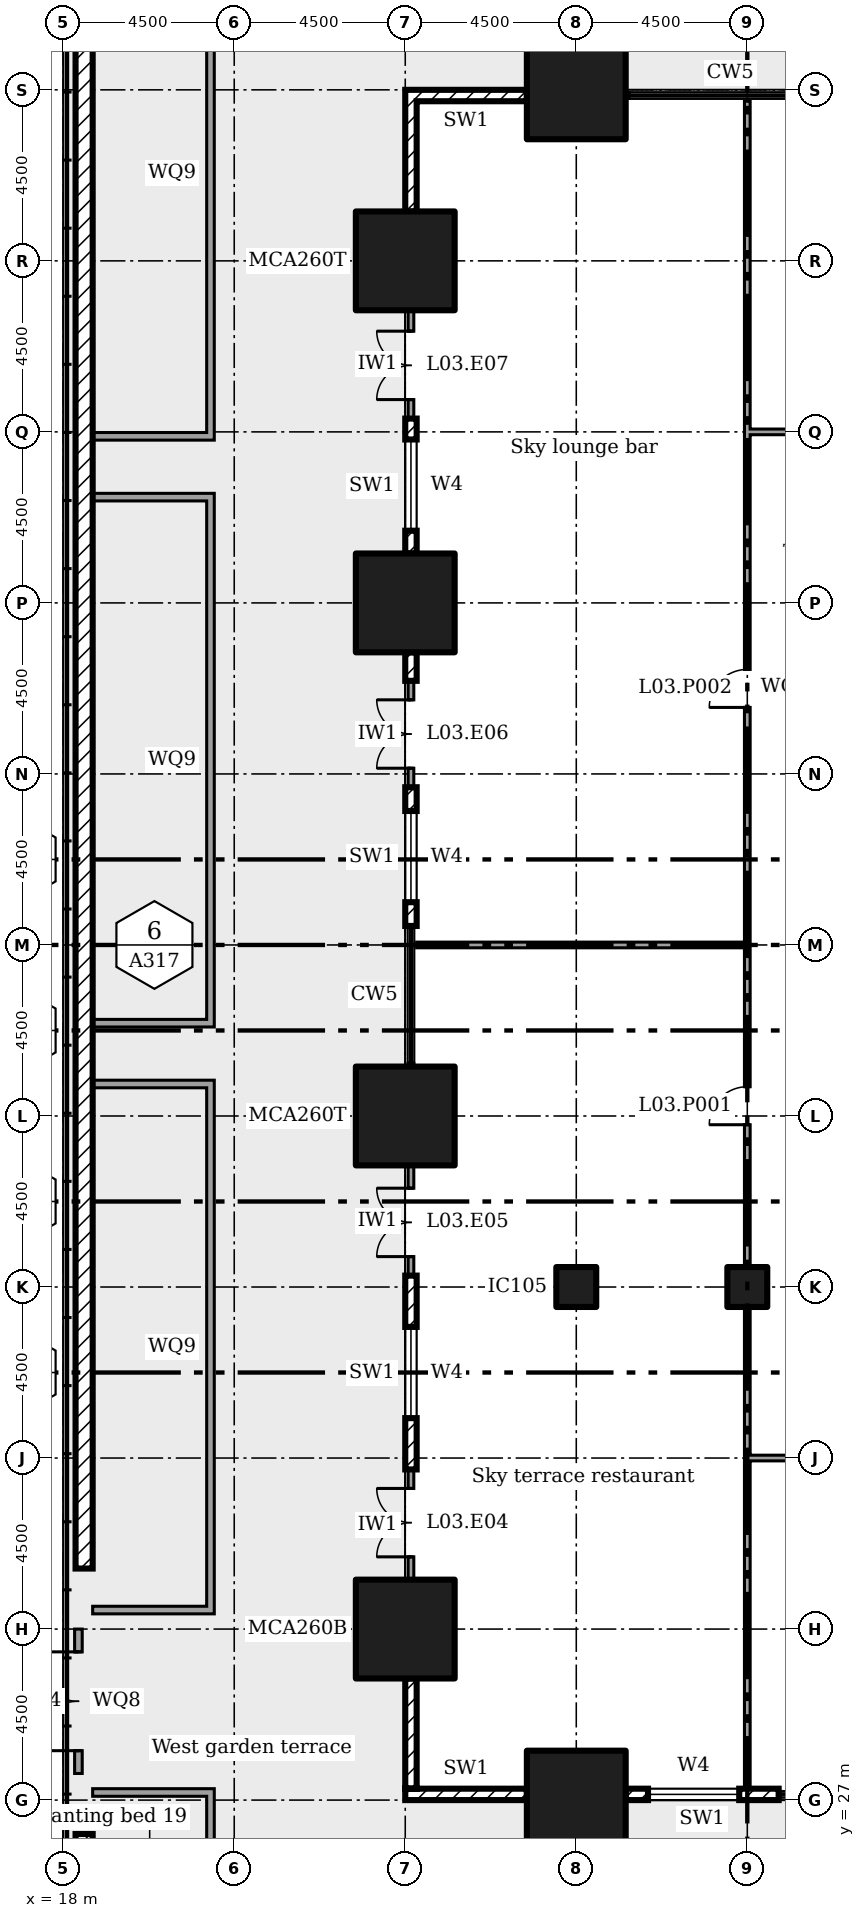
"""IFC4 building model, lengths in metres.
Left out: names, types, materials, properties, quantities, classifications, styles, units other than length and angle.
Written with IfcOpenShell. Run it as: python <this file> out.ifc"""

import sys

from ifc_helpers import new_model, si_unit, direction, frame, frame_2d, origin, origin_2d, place, context, subcontext, project, spatial, rectangle, extrude, element, fill, save


model = new_model("IFC4")
c1 = context("Model", 3, precision=1e-05, world=origin(), true_north=direction((0.0, 1.0)))
c2 = subcontext(c1, "Body", "Model", "MODEL_VIEW")
j1 = project(units=[si_unit("LENGTHUNIT", "METRE"), si_unit("PLANEANGLEUNIT", "RADIAN")], contexts=[c1])
p1 = place(None, origin())
s1 = spatial("IfcSite", under=j1, at=p1, CompositionType="ELEMENT")
p2 = place(p1, origin())
s2 = spatial("IfcBuilding", under=s1, at=p2, CompositionType="ELEMENT")
p3 = place(p2, frame((0.0, 0.0, 16.5)))
s3 = spatial("IfcBuildingStorey", under=s2, at=p3, CompositionType="ELEMENT", Elevation=16.5)
for number, where in (
    (1, (27.0, 31.5, 0.0)),
    (2, (27.0, 45.0, 0.0)),
    (3, (27.0, 58.5, 0.0)),
    (4, (27.0, 67.5, 0.0)),
    (5, (31.5, 27.0, 0.0)),
    (6, (31.5, 72.0, 0.0)),
):
    element("IfcColumn", number, at=place(p3, frame(where)), inside=s3, PredefinedType="COLUMN", context=c2, shape_type="SweptSolid", body=[
        extrude(rectangle(XDim=2.6, YDim=2.6, at=origin_2d()), origin(), (0.0, 0.0, 1.0), 4.5),
    ])
for number, where in (
    (7, (31.5, 40.5, 0.0)),
    (8, (36.0, 40.5, 0.0)),
):
    element("IfcColumn", number, at=place(p3, frame(where)), inside=s3, PredefinedType="COLUMN", context=c2, shape_type="SweptSolid", body=[
        extrude(rectangle(XDim=1.05, YDim=1.05, at=origin_2d()), origin(), (0.0, 0.0, 1.0), 4.5),
    ])
p4 = place(p3, frame((27.0, 27.15, 0.0)))
e9 = element("IfcWall", 9, at=p4, inside=s3, PredefinedType="ELEMENTEDWALL", context=c2, shape_type="SweptSolid", body=[
    extrude(rectangle(XDim=3.2, YDim=0.3, at=frame_2d((1.6, 0.0))), origin(), (0.0, 0.0, 1.0), 4.05),
])
p5 = place(p3, frame((32.8, 27.15, 0.0)))
e10 = element("IfcWall", 10, at=p5, inside=s3, PredefinedType="ELEMENTEDWALL", context=c2, shape_type="SweptSolid", body=[
    extrude(rectangle(XDim=4.025, YDim=0.3, at=frame_2d((2.012, 0.0))), origin(), (0.0, 0.0, 1.0), 2.25),
])
p6 = place(p5, frame((0.587, 0.0, 0.45)))
e11 = element("IfcOpeningElement", 11, at=p6, cuts=e10, PredefinedType="OPENING", context=c2, shape_type="SweptSolid", body=[
    extrude(rectangle(XDim=2.4, YDim=1.7, at=frame_2d((1.2, 0.85))), frame((0.0, 0.16, 0.0), z_axis=(0.0, -1.0, 0.0), x_axis=(1.0, 0.0, 0.0)), (0.0, 0.0, 1.0), 0.32),
])
p7 = place(p3, frame((30.2, 71.85, 0.0), z_axis=(0.0, 0.0, 1.0), x_axis=(-1.0, 0.0, 0.0)))
e12 = element("IfcWall", 12, at=p7, inside=s3, PredefinedType="ELEMENTEDWALL", context=c2, shape_type="SweptSolid", body=[
    extrude(rectangle(XDim=3.2, YDim=0.3, at=frame_2d((1.6, 0.0))), origin(), (0.0, 0.0, 1.0), 4.05),
])
p8 = place(p3, frame((27.15, 71.7, 0.0), z_axis=(0.0, 0.0, 1.0), x_axis=(0.0, -1.0, 0.0)))
e13 = element("IfcWall", 13, at=p8, inside=s3, PredefinedType="ELEMENTEDWALL", context=c2, shape_type="SweptSolid", body=[
    extrude(rectangle(XDim=2.9, YDim=0.3, at=frame_2d((1.45, 0.0))), origin(), (0.0, 0.0, 1.0), 4.05),
])
p9 = place(p3, frame((27.15, 66.2, 0.0), z_axis=(0.0, 0.0, 1.0), x_axis=(0.0, -1.0, 0.0)))
e14 = element("IfcWall", 14, at=p9, inside=s3, PredefinedType="SOLIDWALL", context=c2, shape_type="SweptSolid", body=[
    extrude(rectangle(XDim=2.85, YDim=0.15, at=frame_2d((1.425, 0.0))), origin(), (0.0, 0.0, 1.0), 2.25),
])
p10 = place(p9, frame((0.55, 0.0, 0.0)))
e15 = element("IfcOpeningElement", 15, at=p10, cuts=e14, PredefinedType="OPENING", context=c2, shape_type="SweptSolid", body=[
    extrude(rectangle(XDim=1.8, YDim=2.1, at=frame_2d((0.9, 1.05))), frame((0.0, 0.085, 0.0), z_axis=(0.0, -1.0, 0.0), x_axis=(1.0, 0.0, 0.0)), (0.0, 0.0, 1.0), 0.17),
])
p11 = place(p3, frame((27.15, 63.35, 0.0), z_axis=(0.0, 0.0, 1.0), x_axis=(0.0, -1.0, 0.0)))
e16 = element("IfcWall", 16, at=p11, inside=s3, PredefinedType="ELEMENTEDWALL", context=c2, shape_type="SweptSolid", body=[
    extrude(rectangle(XDim=3.55, YDim=0.3, at=frame_2d((1.775, 0.0))), origin(), (0.0, 0.0, 1.0), 2.25),
])
p12 = place(p11, frame((0.55, 0.0, 0.45)))
e17 = element("IfcOpeningElement", 17, at=p12, cuts=e16, PredefinedType="OPENING", context=c2, shape_type="SweptSolid", body=[
    extrude(rectangle(XDim=2.4, YDim=1.7, at=frame_2d((1.2, 0.85))), frame((0.0, 0.16, 0.0), z_axis=(0.0, -1.0, 0.0), x_axis=(1.0, 0.0, 0.0)), (0.0, 0.0, 1.0), 0.32),
])
p13 = place(p3, frame((27.15, 57.2, 0.0), z_axis=(0.0, 0.0, 1.0), x_axis=(0.0, -1.0, 0.0)))
e18 = element("IfcWall", 18, at=p13, inside=s3, PredefinedType="ELEMENTEDWALL", context=c2, shape_type="SweptSolid", body=[
    extrude(rectangle(XDim=0.75, YDim=0.3, at=frame_2d((0.375, 0.0))), origin(), (0.0, 0.0, 1.0), 2.25),
])
p14 = place(p3, frame((27.15, 56.45, 0.0), z_axis=(0.0, 0.0, 1.0), x_axis=(0.0, -1.0, 0.0)))
e19 = element("IfcWall", 19, at=p14, inside=s3, PredefinedType="SOLIDWALL", context=c2, shape_type="SweptSolid", body=[
    extrude(rectangle(XDim=2.8, YDim=0.15, at=frame_2d((1.4, 0.0))), origin(), (0.0, 0.0, 1.0), 2.25),
])
p15 = place(p14, frame((0.5, 0.0, 0.0)))
e20 = element("IfcOpeningElement", 20, at=p15, cuts=e19, PredefinedType="OPENING", context=c2, shape_type="SweptSolid", body=[
    extrude(rectangle(XDim=1.8, YDim=2.1, at=frame_2d((0.9, 1.05))), frame((0.0, 0.085, 0.0), z_axis=(0.0, -1.0, 0.0), x_axis=(1.0, 0.0, 0.0)), (0.0, 0.0, 1.0), 0.17),
])
p16 = place(p3, frame((27.15, 53.65, 0.0), z_axis=(0.0, 0.0, 1.0), x_axis=(0.0, -1.0, 0.0)))
e21 = element("IfcWall", 21, at=p16, inside=s3, PredefinedType="ELEMENTEDWALL", context=c2, shape_type="SweptSolid", body=[
    extrude(rectangle(XDim=3.65, YDim=0.3, at=frame_2d((1.825, 0.0))), origin(), (0.0, 0.0, 1.0), 2.25),
])
p17 = place(p16, frame((0.625, 0.0, 0.45)))
e22 = element("IfcOpeningElement", 22, at=p17, cuts=e21, PredefinedType="OPENING", context=c2, shape_type="SweptSolid", body=[
    extrude(rectangle(XDim=2.4, YDim=1.7, at=frame_2d((1.2, 0.85))), frame((0.0, 0.16, 0.0), z_axis=(0.0, -1.0, 0.0), x_axis=(1.0, 0.0, 0.0)), (0.0, 0.0, 1.0), 0.32),
])
p18 = place(p3, frame((27.15, 43.7, 0.0), z_axis=(0.0, 0.0, 1.0), x_axis=(0.0, -1.0, 0.0)))
e23 = element("IfcWall", 23, at=p18, inside=s3, PredefinedType="SOLIDWALL", context=c2, shape_type="SweptSolid", body=[
    extrude(rectangle(XDim=2.9, YDim=0.15, at=frame_2d((1.45, 0.0))), origin(), (0.0, 0.0, 1.0), 2.25),
])
p19 = place(p18, frame((0.6, 0.0, 0.0)))
e24 = element("IfcOpeningElement", 24, at=p19, cuts=e23, PredefinedType="OPENING", context=c2, shape_type="SweptSolid", body=[
    extrude(rectangle(XDim=1.8, YDim=2.1, at=frame_2d((0.9, 1.05))), frame((0.0, 0.085, 0.0), z_axis=(0.0, -1.0, 0.0), x_axis=(1.0, 0.0, 0.0)), (0.0, 0.0, 1.0), 0.17),
])
p20 = place(p3, frame((27.15, 40.8, 0.0), z_axis=(0.0, 0.0, 1.0), x_axis=(0.0, -1.0, 0.0)))
e25 = element("IfcWall", 25, at=p20, inside=s3, PredefinedType="ELEMENTEDWALL", context=c2, shape_type="SweptSolid", body=[
    extrude(rectangle(XDim=5.1, YDim=0.3, at=frame_2d((2.55, 0.0))), origin(), (0.0, 0.0, 1.0), 2.25),
])
p21 = place(p20, frame((1.35, 0.0, 0.45)))
e26 = element("IfcOpeningElement", 26, at=p21, cuts=e25, PredefinedType="OPENING", context=c2, shape_type="SweptSolid", body=[
    extrude(rectangle(XDim=2.4, YDim=1.7, at=frame_2d((1.2, 0.85))), frame((0.0, 0.16, 0.0), z_axis=(0.0, -1.0, 0.0), x_axis=(1.0, 0.0, 0.0)), (0.0, 0.0, 1.0), 0.32),
])
p22 = place(p3, frame((27.15, 35.7, 0.0), z_axis=(0.0, 0.0, 1.0), x_axis=(0.0, -1.0, 0.0)))
e27 = element("IfcWall", 27, at=p22, inside=s3, PredefinedType="SOLIDWALL", context=c2, shape_type="SweptSolid", body=[
    extrude(rectangle(XDim=2.9, YDim=0.15, at=frame_2d((1.45, 0.0))), origin(), (0.0, 0.0, 1.0), 2.25),
])
p23 = place(p22, frame((0.5, 0.0, 0.0)))
e28 = element("IfcOpeningElement", 28, at=p23, cuts=e27, PredefinedType="OPENING", context=c2, shape_type="SweptSolid", body=[
    extrude(rectangle(XDim=1.8, YDim=2.1, at=frame_2d((0.9, 1.05))), frame((0.0, 0.085, 0.0), z_axis=(0.0, -1.0, 0.0), x_axis=(1.0, 0.0, 0.0)), (0.0, 0.0, 1.0), 0.17),
])
p24 = place(p3, frame((27.15, 30.2, 0.0), z_axis=(0.0, 0.0, 1.0), x_axis=(0.0, -1.0, 0.0)))
e29 = element("IfcWall", 29, at=p24, inside=s3, PredefinedType="ELEMENTEDWALL", context=c2, shape_type="SweptSolid", body=[
    extrude(rectangle(XDim=2.9, YDim=0.3, at=frame_2d((1.45, 0.0))), origin(), (0.0, 0.0, 1.0), 4.05),
])
p25 = place(p3, frame((18.55, 80.225, 0.0), z_axis=(0.0, 0.0, 1.0), x_axis=(0.0, -1.0, 0.0)))
e30 = element("IfcWall", 30, at=p25, inside=s3, PredefinedType="SOLIDWALL", context=c2, shape_type="SweptSolid", body=[
    extrude(rectangle(XDim=47.133, YDim=0.45, at=frame_2d((23.566, 0.0))), origin(), (0.0, 0.0, 1.0), 0.6),
])
p26 = place(p3, frame((18.55, 26.107, 0.0), z_axis=(0.0, 0.0, 1.0), x_axis=(0.0, -1.0, 0.0)))
e31 = element("IfcWall", 31, at=p26, inside=s3, PredefinedType="SOLIDWALL", context=c2, shape_type="SweptSolid", body=[
    extrude(rectangle(XDim=7.333, YDim=0.45, at=frame_2d((3.666, 0.0))), origin(), (0.0, 0.0, 1.0), 0.6),
])
p27 = place(p3, frame((21.875, 22.175, 0.0), z_axis=(0.0, 0.0, 1.0), x_axis=(0.0, 1.0, 0.0)))
e32 = element("IfcWall", 32, at=p27, inside=s3, PredefinedType="SOLIDWALL", context=c2, shape_type="SweptSolid", body=[
    extrude(rectangle(XDim=5.125, YDim=0.2, at=frame_2d((2.562, 0.0))), origin(), (0.0, 0.0, 1.0), 0.45),
])
p28 = place(p3, frame((18.775, 27.2, 0.0)))
e33 = element("IfcWall", 33, at=p28, inside=s3, PredefinedType="SOLIDWALL", context=c2, shape_type="SweptSolid", body=[
    extrude(rectangle(XDim=3.0, YDim=0.2, at=frame_2d((1.5, 0.0))), origin(), (0.0, 0.0, 1.0), 0.45),
])
p29 = place(p3, frame((21.875, 31.9, 0.0), z_axis=(0.0, 0.0, 1.0), x_axis=(0.0, 1.0, 0.0)))
e34 = element("IfcWall", 34, at=p29, inside=s3, PredefinedType="SOLIDWALL", context=c2, shape_type="SweptSolid", body=[
    extrude(rectangle(XDim=14.042, YDim=0.2, at=frame_2d((7.021, 0.0))), origin(), (0.0, 0.0, 1.0), 0.45),
])
for number, where in (
    (35, (18.775, 45.842, 0.0)),
    (36, (18.775, 32.0, 0.0)),
):
    element("IfcWall", number, at=place(p3, frame(where)), inside=s3, PredefinedType="SOLIDWALL", context=c2, shape_type="SweptSolid", body=[
        extrude(rectangle(XDim=3.0, YDim=0.2, at=frame_2d((1.5, 0.0))), origin(), (0.0, 0.0, 1.0), 0.45),
    ])
p30 = place(p3, frame((21.875, 47.342, 0.0), z_axis=(0.0, 0.0, 1.0), x_axis=(0.0, 1.0, 0.0)))
e37 = element("IfcWall", 37, at=p30, inside=s3, PredefinedType="SOLIDWALL", context=c2, shape_type="SweptSolid", body=[
    extrude(rectangle(XDim=14.042, YDim=0.2, at=frame_2d((7.021, 0.0))), origin(), (0.0, 0.0, 1.0), 0.45),
])
for number, where in (
    (38, (18.775, 61.283, 0.0)),
    (39, (18.775, 47.442, 0.0)),
):
    element("IfcWall", number, at=place(p3, frame(where)), inside=s3, PredefinedType="SOLIDWALL", context=c2, shape_type="SweptSolid", body=[
        extrude(rectangle(XDim=3.0, YDim=0.2, at=frame_2d((1.5, 0.0))), origin(), (0.0, 0.0, 1.0), 0.45),
    ])
p31 = place(p3, frame((21.875, 62.783, 0.0), z_axis=(0.0, 0.0, 1.0), x_axis=(0.0, 1.0, 0.0)))
e40 = element("IfcWall", 40, at=p31, inside=s3, PredefinedType="SOLIDWALL", context=c2, shape_type="SweptSolid", body=[
    extrude(rectangle(XDim=14.042, YDim=0.2, at=frame_2d((7.021, 0.0))), origin(), (0.0, 0.0, 1.0), 0.45),
])
p32 = place(p3, frame((18.775, 62.883, 0.0)))
e41 = element("IfcWall", 41, at=p32, inside=s3, PredefinedType="SOLIDWALL", context=c2, shape_type="SweptSolid", body=[
    extrude(rectangle(XDim=3.0, YDim=0.2, at=frame_2d((1.5, 0.0))), origin(), (0.0, 0.0, 1.0), 0.45),
])
p33 = place(p3, frame((36.0, 35.925, 0.0), z_axis=(0.0, 0.0, 1.0), x_axis=(0.0, 1.0, 0.0)))
e42 = element("IfcWall", 42, at=p33, inside=s3, PredefinedType="PARTITIONING", context=c2, shape_type="SweptSolid", body=[
    extrude(rectangle(XDim=4.055, YDim=0.15, at=frame_2d((2.027, 0.0))), origin(), (0.0, 0.0, 1.0), 4.05),
])
p34 = place(p3, frame((36.0, 41.02, 0.0), z_axis=(0.0, 0.0, 1.0), x_axis=(0.0, 1.0, 0.0)))
e43 = element("IfcWall", 43, at=p34, inside=s3, PredefinedType="PARTITIONING", context=c2, shape_type="SweptSolid", body=[
    extrude(rectangle(XDim=8.555, YDim=0.15, at=frame_2d((4.277, 0.0))), origin(), (0.0, 0.0, 1.0), 4.05),
])
p35 = place(p34, frame((3.75, 0.0, 0.0)))
e44 = element("IfcOpeningElement", 44, at=p35, cuts=e43, PredefinedType="OPENING", context=c2, shape_type="SweptSolid", body=[
    extrude(rectangle(XDim=1.0, YDim=2.1, at=frame_2d((0.5, 1.05))), frame((0.0, 0.085, 0.0), z_axis=(0.0, -1.0, 0.0), x_axis=(1.0, 0.0, 0.0)), (0.0, 0.0, 1.0), 0.17),
])
p36 = place(p3, frame((36.0, 49.5, 0.0), z_axis=(0.0, 0.0, 1.0), x_axis=(0.0, 1.0, 0.0)))
e45 = element("IfcWall", 45, at=p36, inside=s3, PredefinedType="PARTITIONING", context=c2, shape_type="SweptSolid", body=[
    extrude(rectangle(XDim=13.575, YDim=0.15, at=frame_2d((6.788, 0.0))), origin(), (0.0, 0.0, 1.0), 4.05),
])
p37 = place(p36, frame((6.25, 0.0, 0.0)))
e46 = element("IfcOpeningElement", 46, at=p37, cuts=e45, PredefinedType="OPENING", context=c2, shape_type="SweptSolid", body=[
    extrude(rectangle(XDim=1.0, YDim=2.1, at=frame_2d((0.5, 1.05))), frame((0.0, 0.085, 0.0), z_axis=(0.0, -1.0, 0.0), x_axis=(1.0, 0.0, 0.0)), (0.0, 0.0, 1.0), 0.17),
])
p38 = place(p3, frame((36.075, 36.0, 0.0)))
e47 = element("IfcWall", 47, at=p38, inside=s3, PredefinedType="PARTITIONING", context=c2, shape_type="SweptSolid", body=[
    extrude(rectangle(XDim=21.905, YDim=0.15, at=frame_2d((10.953, 0.0))), origin(), (0.0, 0.0, 1.0), 4.05),
])
p39 = place(p38, frame((10.425, 0.0, 0.0)))
e48 = element("IfcOpeningElement", 48, at=p39, cuts=e47, PredefinedType="OPENING", context=c2, shape_type="SweptSolid", body=[
    extrude(rectangle(XDim=1.0, YDim=2.1, at=frame_2d((0.5, 1.05))), frame((0.0, 0.085, 0.0), z_axis=(0.0, -1.0, 0.0), x_axis=(1.0, 0.0, 0.0)), (0.0, 0.0, 1.0), 0.17),
])
p40 = place(p3, frame((36.075, 63.0, 0.0)))
e49 = element("IfcWall", 49, at=p40, inside=s3, PredefinedType="PARTITIONING", context=c2, shape_type="SweptSolid", body=[
    extrude(rectangle(XDim=3.75, YDim=0.15, at=frame_2d((1.875, 0.0))), origin(), (0.0, 0.0, 1.0), 4.05),
])
p41 = place(p3, frame((27.3, 49.5, 0.0)))
e50 = element("IfcWall", 50, at=p41, inside=s3, PredefinedType="PARTITIONING", context=c2, shape_type="SweptSolid", body=[
    extrude(rectangle(XDim=8.625, YDim=0.15, at=frame_2d((4.312, 0.0))), origin(), (0.0, 0.0, 1.0), 4.05),
])
for number, where, z_axis, x_axis in (
    (51, (36.0, 27.3, 0.0), (0.0, 0.0, 1.0), (0.0, 1.0, 0.0)),
    (52, (36.0, 63.0, 0.0), (0.0, 0.0, 1.0), (0.0, 1.0, 0.0)),
):
    element("IfcWall", number, at=place(p3, frame(where, z_axis=z_axis, x_axis=x_axis)), inside=s3, PredefinedType="PARTITIONING", context=c2, shape_type="SweptSolid", body=[
        extrude(rectangle(XDim=8.7, YDim=0.15, at=frame_2d((4.35, 0.0))), origin(), (0.0, 0.0, 1.0), 4.05),
    ])
p42 = place(p3, frame((18.4, 27.7, 0.0), z_axis=(0.0, 0.0, 1.0), x_axis=(0.0, 1.0, 0.0)))
e53 = element("IfcWall", 53, at=p42, inside=s3, PredefinedType="SOLIDWALL", context=c2, shape_type="SweptSolid", body=[
    extrude(rectangle(XDim=3.8, YDim=0.2, at=frame_2d((1.9, 0.0))), origin(), (0.0, 0.0, 1.0), 2.3),
])
p43 = place(p42, frame((0.6, 0.0, 0.0)))
e54 = element("IfcOpeningElement", 54, at=p43, cuts=e53, PredefinedType="OPENING", context=c2, shape_type="SweptSolid", body=[
    extrude(rectangle(XDim=2.6, YDim=2.1, at=frame_2d((1.3, 1.05))), frame((0.0, 0.11, 0.0), z_axis=(0.0, -1.0, 0.0), x_axis=(1.0, 0.0, 0.0)), (0.0, 0.0, 1.0), 0.22),
])
p44 = place(p6, origin())
e55 = element("IfcWindow", 55, at=p44, inside=s3, PartitioningType="SINGLE_PANEL", PredefinedType="WINDOW", context=c2, shape_type="SweptSolid", body=[
    extrude(rectangle(XDim=2.4, YDim=1.7, at=frame_2d((1.2, 0.85))), frame((0.0, 0.03, 0.0), z_axis=(0.0, -1.0, 0.0), x_axis=(1.0, 0.0, 0.0)), (0.0, 0.0, 1.0), 0.06),
])
fill(e11, e55)
p45 = place(p10, frame((1.8, 0.0, 0.0), x_axis=(-1.0, 0.0, 0.0)))
e56 = element("IfcDoor", 56, at=p45, inside=s3, OperationType="DOUBLE_DOOR_DOUBLE_SWING", PredefinedType="NOTDEFINED", context=c2, shape_type="SweptSolid", body=[
    extrude(rectangle(XDim=1.8, YDim=2.1, at=frame_2d((0.9, 1.05))), frame((0.0, 0.025, 0.0), z_axis=(0.0, -1.0, 0.0), x_axis=(1.0, 0.0, 0.0)), (0.0, 0.0, 1.0), 0.05),
])
fill(e15, e56)
p46 = place(p12, origin())
e57 = element("IfcWindow", 57, at=p46, inside=s3, PartitioningType="SINGLE_PANEL", PredefinedType="WINDOW", context=c2, shape_type="SweptSolid", body=[
    extrude(rectangle(XDim=2.4, YDim=1.7, at=frame_2d((1.2, 0.85))), frame((0.0, 0.03, 0.0), z_axis=(0.0, -1.0, 0.0), x_axis=(1.0, 0.0, 0.0)), (0.0, 0.0, 1.0), 0.06),
])
fill(e17, e57)
p47 = place(p15, frame((1.8, 0.0, 0.0), x_axis=(-1.0, 0.0, 0.0)))
e58 = element("IfcDoor", 58, at=p47, inside=s3, OperationType="DOUBLE_DOOR_DOUBLE_SWING", PredefinedType="NOTDEFINED", context=c2, shape_type="SweptSolid", body=[
    extrude(rectangle(XDim=1.8, YDim=2.1, at=frame_2d((0.9, 1.05))), frame((0.0, 0.025, 0.0), z_axis=(0.0, -1.0, 0.0), x_axis=(1.0, 0.0, 0.0)), (0.0, 0.0, 1.0), 0.05),
])
fill(e20, e58)
p48 = place(p17, origin())
e59 = element("IfcWindow", 59, at=p48, inside=s3, PartitioningType="SINGLE_PANEL", PredefinedType="WINDOW", context=c2, shape_type="SweptSolid", body=[
    extrude(rectangle(XDim=2.4, YDim=1.7, at=frame_2d((1.2, 0.85))), frame((0.0, 0.03, 0.0), z_axis=(0.0, -1.0, 0.0), x_axis=(1.0, 0.0, 0.0)), (0.0, 0.0, 1.0), 0.06),
])
fill(e22, e59)
p49 = place(p19, frame((1.8, 0.0, 0.0), x_axis=(-1.0, 0.0, 0.0)))
e60 = element("IfcDoor", 60, at=p49, inside=s3, OperationType="DOUBLE_DOOR_DOUBLE_SWING", PredefinedType="NOTDEFINED", context=c2, shape_type="SweptSolid", body=[
    extrude(rectangle(XDim=1.8, YDim=2.1, at=frame_2d((0.9, 1.05))), frame((0.0, 0.025, 0.0), z_axis=(0.0, -1.0, 0.0), x_axis=(1.0, 0.0, 0.0)), (0.0, 0.0, 1.0), 0.05),
])
fill(e24, e60)
p50 = place(p21, origin())
e61 = element("IfcWindow", 61, at=p50, inside=s3, PartitioningType="SINGLE_PANEL", PredefinedType="WINDOW", context=c2, shape_type="SweptSolid", body=[
    extrude(rectangle(XDim=2.4, YDim=1.7, at=frame_2d((1.2, 0.85))), frame((0.0, 0.03, 0.0), z_axis=(0.0, -1.0, 0.0), x_axis=(1.0, 0.0, 0.0)), (0.0, 0.0, 1.0), 0.06),
])
fill(e26, e61)
p51 = place(p23, frame((1.8, 0.0, 0.0), x_axis=(-1.0, 0.0, 0.0)))
e62 = element("IfcDoor", 62, at=p51, inside=s3, OperationType="DOUBLE_DOOR_DOUBLE_SWING", PredefinedType="NOTDEFINED", context=c2, shape_type="SweptSolid", body=[
    extrude(rectangle(XDim=1.8, YDim=2.1, at=frame_2d((0.9, 1.05))), frame((0.0, 0.025, 0.0), z_axis=(0.0, -1.0, 0.0), x_axis=(1.0, 0.0, 0.0)), (0.0, 0.0, 1.0), 0.05),
])
fill(e28, e62)
p52 = place(p35, origin())
e63 = element("IfcDoor", 63, at=p52, inside=s3, OperationType="SINGLE_SWING_RIGHT", PredefinedType="DOOR", context=c2, shape_type="SweptSolid", body=[
    extrude(rectangle(XDim=1.0, YDim=2.1, at=frame_2d((0.5, 1.05))), frame((0.0, 0.025, 0.0), z_axis=(0.0, -1.0, 0.0), x_axis=(1.0, 0.0, 0.0)), (0.0, 0.0, 1.0), 0.05),
])
fill(e44, e63)
p53 = place(p37, origin())
e64 = element("IfcDoor", 64, at=p53, inside=s3, OperationType="SINGLE_SWING_RIGHT", PredefinedType="DOOR", context=c2, shape_type="SweptSolid", body=[
    extrude(rectangle(XDim=1.0, YDim=2.1, at=frame_2d((0.5, 1.05))), frame((0.0, 0.025, 0.0), z_axis=(0.0, -1.0, 0.0), x_axis=(1.0, 0.0, 0.0)), (0.0, 0.0, 1.0), 0.05),
])
fill(e46, e64)
p54 = place(p43, origin())
e65 = element("IfcDoor", 65, at=p54, inside=s3, OperationType="DOUBLE_DOOR_SINGLE_SWING", PredefinedType="GATE", context=c2, shape_type="SweptSolid", body=[
    extrude(rectangle(XDim=2.6, YDim=2.1, at=frame_2d((1.3, 1.05))), frame((0.0, 0.025, 0.0), z_axis=(0.0, -1.0, 0.0), x_axis=(1.0, 0.0, 0.0)), (0.0, 0.0, 1.0), 0.05),
])
fill(e54, e65)
save(model, sys.argv[1])
